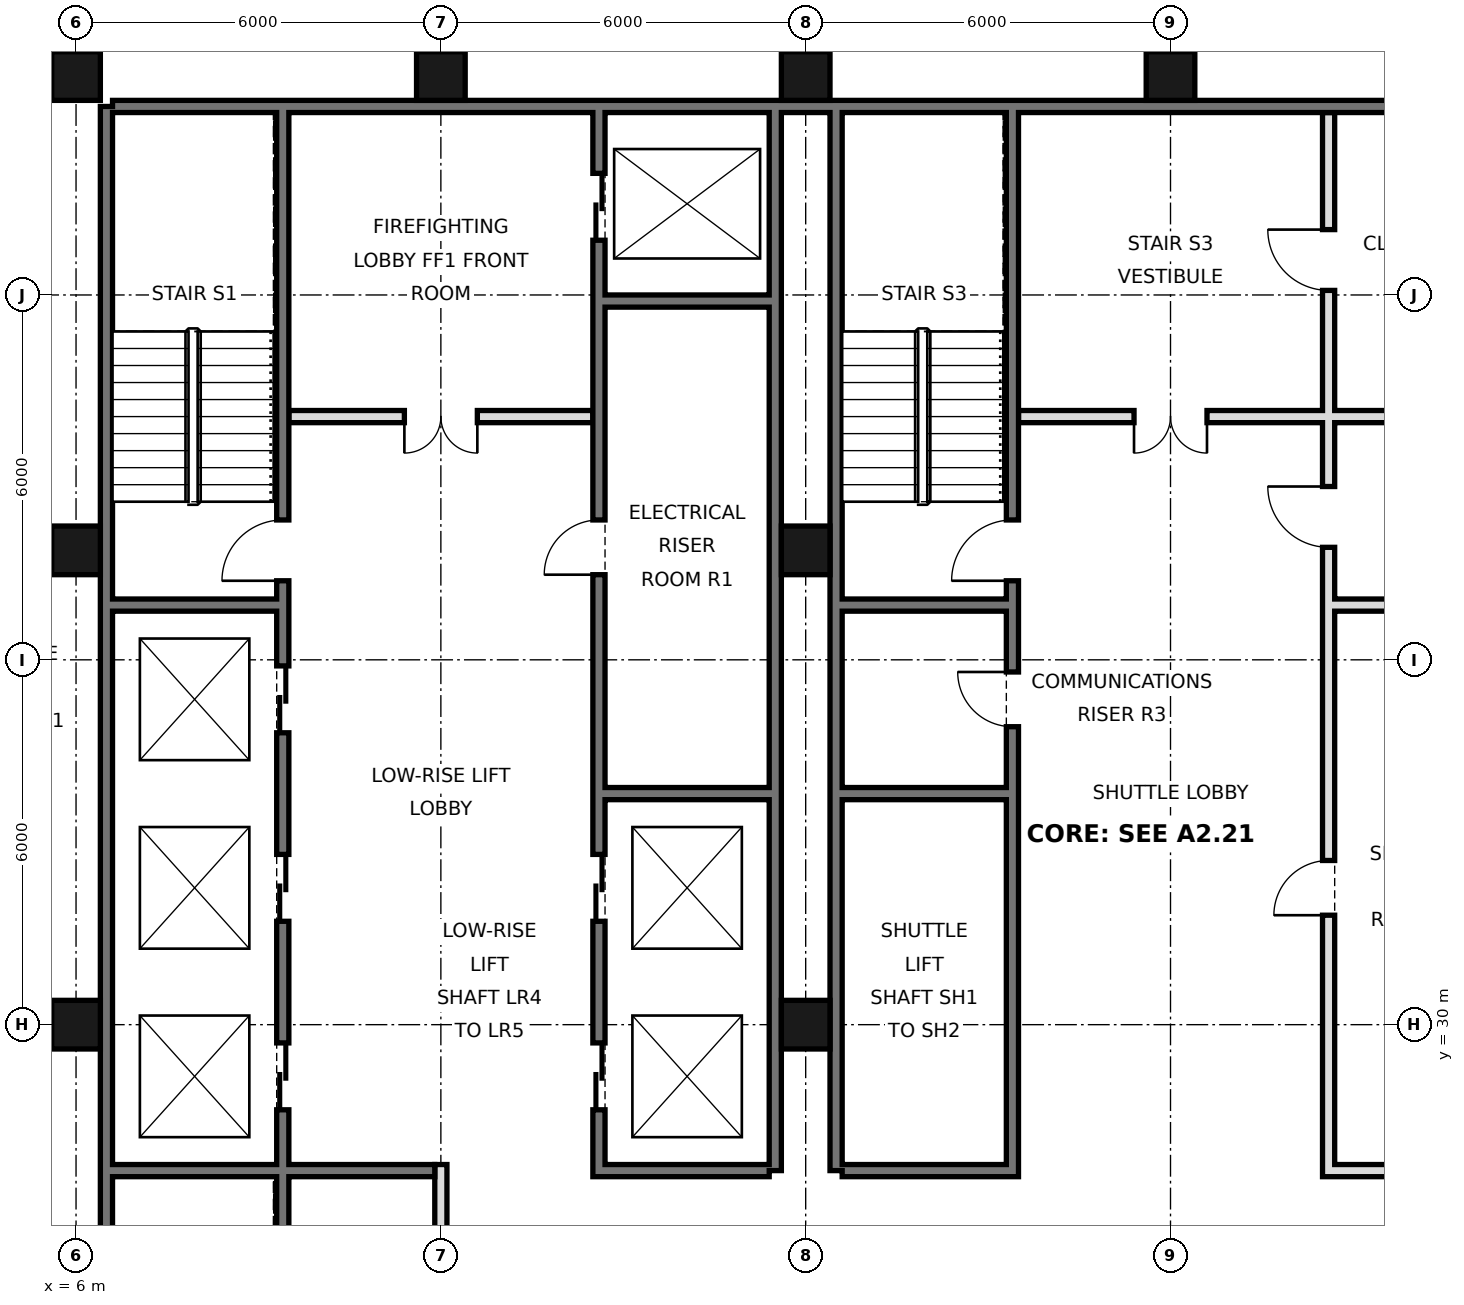
"""IFC4 building model, lengths in metres.
Left out: names, types, materials, properties, quantities, classifications, styles, units other than length and angle.
Written with IfcOpenShell. Run it as: python <this file> out.ifc"""

import sys

from ifc_helpers import new_model, si_unit, direction, frame, frame_2d, origin, origin_2d, place, context, subcontext, project, spatial, rectangle, hollow_rectangle, extrude, element, fill, save


model = new_model("IFC4")
c1 = context("Model", 3, precision=1e-05, world=origin(), true_north=direction((0.0, 1.0)))
c2 = subcontext(c1, "Body", "Model", "MODEL_VIEW")
j1 = project(units=[si_unit("LENGTHUNIT", "METRE"), si_unit("PLANEANGLEUNIT", "RADIAN")], contexts=[c1])
p1 = place(None, origin())
s1 = spatial("IfcSite", under=j1, at=p1, CompositionType="ELEMENT")
p2 = place(p1, origin())
s2 = spatial("IfcBuilding", under=s1, at=p2, CompositionType="ELEMENT")
p3 = place(p2, frame((0.0, 0.0, 82.2)))
s3 = spatial("IfcBuildingStorey", under=s2, at=p3, CompositionType="ELEMENT", Elevation=82.2)
for number, where, z_axis, x_axis in (
    (1, (6.0, 30.0, 0.0), (0.0, 0.0, 1.0), (1.0, 0.0, 0.0)),
    (2, (6.0, 37.8, 0.0), (0.0, 0.0, 1.0), (1.0, 0.0, 0.0)),
    (3, (6.0, 45.6, 0.0), (0.0, 0.0, 1.0), (1.0, 0.0, 0.0)),
    (4, (12.0, 45.6, 0.0), (0.0, 0.0, 1.0), (1.0, 0.0, 0.0)),
    (5, (18.0, 30.0, 0.0), (0.0, 0.0, 1.0), (1.0, 0.0, 0.0)),
    (6, (18.0, 37.8, 0.0), (0.0, 0.0, 1.0), (1.0, 0.0, 0.0)),
    (7, (18.0, 45.6, 0.0), (0.0, 0.0, 1.0), (1.0, 0.0, 0.0)),
    (8, (24.0, 45.6, 0.0), (0.0, 0.0, 1.0), (1.0, 0.0, 0.0)),
):
    element("IfcColumn", number, at=place(p3, frame(where, z_axis=z_axis, x_axis=x_axis)), inside=s3, PredefinedType="COLUMN", context=c2, shape_type="SweptSolid", body=[
        extrude(hollow_rectangle(XDim=0.8, YDim=0.8, WallThickness=0.06, at=origin_2d()), origin(), (0.0, 0.0, 1.0), 3.6),
    ])
p4 = place(p3, frame((6.5, 21.6, 0.0), z_axis=(0.0, 0.0, 1.0), x_axis=(0.0, 1.0, 0.0)))
e9 = element("IfcWall", 9, at=p4, inside=s3, PredefinedType="SOLIDWALL", context=c2, shape_type="SweptSolid", body=[
    extrude(rectangle(XDim=23.5, YDim=0.2, at=frame_2d((11.75, 0.0))), origin(), (0.0, 0.0, 1.0), 3.42),
])
p5 = place(p3, frame((6.6, 45.1, 0.0), z_axis=(0.0, 0.0, 1.0), x_axis=(1.0, 0.0, 0.0)))
e10 = element("IfcWall", 10, at=p5, inside=s3, PredefinedType="SOLIDWALL", context=c2, shape_type="SweptSolid", body=[
    extrude(rectangle(XDim=34.8, YDim=0.2, at=frame_2d((17.4, 0.0))), origin(), (0.0, 0.0, 1.0), 3.42),
])
for number, where, z_axis, x_axis in (
    (11, (17.5, 27.6, 0.0), (0.0, 0.0, 1.0), (0.0, 1.0, 0.0)),
    (12, (18.5, 27.6, 0.0), (0.0, 0.0, 1.0), (0.0, 1.0, 0.0)),
):
    element("IfcWall", number, at=place(p3, frame(where, z_axis=z_axis, x_axis=x_axis)), inside=s3, PredefinedType="SOLIDWALL", context=c2, shape_type="SweptSolid", body=[
        extrude(rectangle(XDim=17.5, YDim=0.2, at=frame_2d((8.75, 0.0))), origin(), (0.0, 0.0, 1.0), 3.42),
    ])
p6 = place(p3, frame((12.0, 21.6, 0.0), z_axis=(0.0, 0.0, 1.0), x_axis=(0.0, 1.0, 0.0)))
e13 = element("IfcWall", 13, at=p6, inside=s3, PredefinedType="PARTITIONING", context=c2, shape_type="SweptSolid", body=[
    extrude(rectangle(XDim=6.1, YDim=0.2, at=frame_2d((3.05, 0.0))), origin(), (0.0, 0.0, 1.0), 3.42),
])
p7 = place(p3, frame((14.6, 27.5, 0.0), z_axis=(0.0, 0.0, 1.0), x_axis=(0.0, 1.0, 0.0)))
e14 = element("IfcWall", 14, at=p7, inside=s3, PredefinedType="SOLIDWALL", context=c2, shape_type="SweptSolid", body=[
    extrude(rectangle(XDim=17.5, YDim=0.2, at=frame_2d((8.75, 0.0))), origin(), (0.0, 0.0, 1.0), 3.42),
])
p8 = place(p7, frame((1.1, 0.0, 0.0)))
e15 = element("IfcOpeningElement", 15, at=p8, cuts=e14, PredefinedType="OPENING", context=c2, shape_type="SweptSolid", body=[
    extrude(rectangle(XDim=1.1, YDim=2.1, at=frame_2d((0.55, 1.05))), frame((0.0, 0.11, 0.0), z_axis=(0.0, -1.0, 0.0), x_axis=(1.0, 0.0, 0.0)), (0.0, 0.0, 1.0), 0.22),
])
p9 = place(p7, frame((4.2, 0.0, 0.0)))
e16 = element("IfcOpeningElement", 16, at=p9, cuts=e14, PredefinedType="OPENING", context=c2, shape_type="SweptSolid", body=[
    extrude(rectangle(XDim=1.1, YDim=2.1, at=frame_2d((0.55, 1.05))), frame((0.0, 0.11, 0.0), z_axis=(0.0, -1.0, 0.0), x_axis=(1.0, 0.0, 0.0)), (0.0, 0.0, 1.0), 0.22),
])
p10 = place(p7, frame((15.4, 0.0, 0.0)))
e17 = element("IfcOpeningElement", 17, at=p10, cuts=e14, PredefinedType="OPENING", context=c2, shape_type="SweptSolid", body=[
    extrude(rectangle(XDim=1.1, YDim=2.1, at=frame_2d((0.55, 1.05))), frame((0.0, 0.11, 0.0), z_axis=(0.0, -1.0, 0.0), x_axis=(1.0, 0.0, 0.0)), (0.0, 0.0, 1.0), 0.22),
])
p11 = place(p7, frame((9.9, 0.0, 0.0)))
e18 = element("IfcOpeningElement", 18, at=p11, cuts=e14, PredefinedType="OPENING", context=c2, shape_type="SweptSolid", body=[
    extrude(rectangle(XDim=0.9, YDim=2.1, at=frame_2d((0.45, 1.05))), frame((0.0, 0.11, 0.0), z_axis=(0.0, -1.0, 0.0), x_axis=(1.0, 0.0, 0.0)), (0.0, 0.0, 1.0), 0.22),
])
p12 = place(p3, frame((21.4, 27.5, 0.0), z_axis=(0.0, 0.0, 1.0), x_axis=(0.0, 1.0, 0.0)))
e19 = element("IfcWall", 19, at=p12, inside=s3, PredefinedType="SOLIDWALL", context=c2, shape_type="SweptSolid", body=[
    extrude(rectangle(XDim=17.5, YDim=0.2, at=frame_2d((8.75, 0.0))), origin(), (0.0, 0.0, 1.0), 3.42),
])
p13 = place(p12, frame((9.8, 0.0, 0.0)))
e20 = element("IfcOpeningElement", 20, at=p13, cuts=e19, PredefinedType="OPENING", context=c2, shape_type="SweptSolid", body=[
    extrude(rectangle(XDim=1.0, YDim=2.1, at=frame_2d((0.5, 1.05))), frame((0.0, 0.11, 0.0), z_axis=(0.0, -1.0, 0.0), x_axis=(1.0, 0.0, 0.0)), (0.0, 0.0, 1.0), 0.22),
])
p14 = place(p12, frame((7.4, 0.0, 0.0)))
e21 = element("IfcOpeningElement", 21, at=p14, cuts=e19, PredefinedType="OPENING", context=c2, shape_type="SweptSolid", body=[
    extrude(rectangle(XDim=0.9, YDim=2.1, at=frame_2d((0.45, 1.05))), frame((0.0, 0.11, 0.0), z_axis=(0.0, -1.0, 0.0), x_axis=(1.0, 0.0, 0.0)), (0.0, 0.0, 1.0), 0.22),
])
p15 = place(p3, frame((26.6, 27.5, 0.0), z_axis=(0.0, 0.0, 1.0), x_axis=(0.0, 1.0, 0.0)))
e22 = element("IfcWall", 22, at=p15, inside=s3, PredefinedType="SOLIDWALL", context=c2, shape_type="SweptSolid", body=[
    extrude(rectangle(XDim=17.5, YDim=0.2, at=frame_2d((8.75, 0.0))), origin(), (0.0, 0.0, 1.0), 3.42),
])
p16 = place(p15, frame((4.3, 0.0, 0.0)))
e23 = element("IfcOpeningElement", 23, at=p16, cuts=e22, PredefinedType="OPENING", context=c2, shape_type="SweptSolid", body=[
    extrude(rectangle(XDim=0.9, YDim=2.1, at=frame_2d((0.45, 1.05))), frame((0.0, 0.11, 0.0), z_axis=(0.0, -1.0, 0.0), x_axis=(1.0, 0.0, 0.0)), (0.0, 0.0, 1.0), 0.22),
])
p17 = place(p15, frame((10.35, 0.0, 0.0)))
e24 = element("IfcOpeningElement", 24, at=p17, cuts=e22, PredefinedType="OPENING", context=c2, shape_type="SweptSolid", body=[
    extrude(rectangle(XDim=1.0, YDim=2.1, at=frame_2d((0.5, 1.05))), frame((0.0, 0.11, 0.0), z_axis=(0.0, -1.0, 0.0), x_axis=(1.0, 0.0, 0.0)), (0.0, 0.0, 1.0), 0.22),
])
p18 = place(p15, frame((14.575, 0.0, 0.0)))
e25 = element("IfcOpeningElement", 25, at=p18, cuts=e22, PredefinedType="OPENING", context=c2, shape_type="SweptSolid", body=[
    extrude(rectangle(XDim=1.0, YDim=2.1, at=frame_2d((0.5, 1.05))), frame((0.0, 0.11, 0.0), z_axis=(0.0, -1.0, 0.0), x_axis=(1.0, 0.0, 0.0)), (0.0, 0.0, 1.0), 0.22),
])
p19 = place(p3, frame((9.4, 21.6, 0.0), z_axis=(0.0, 0.0, 1.0), x_axis=(0.0, 1.0, 0.0)))
e26 = element("IfcWall", 26, at=p19, inside=s3, PredefinedType="SOLIDWALL", context=c2, shape_type="SweptSolid", body=[
    extrude(rectangle(XDim=23.4, YDim=0.2, at=frame_2d((11.7, 0.0))), origin(), (0.0, 0.0, 1.0), 3.42),
])
p20 = place(p19, frame((7.0, 0.0, 0.0)))
e27 = element("IfcOpeningElement", 27, at=p20, cuts=e26, PredefinedType="OPENING", context=c2, shape_type="SweptSolid", body=[
    extrude(rectangle(XDim=1.1, YDim=2.1, at=frame_2d((0.55, 1.05))), frame((0.0, 0.11, 0.0), z_axis=(0.0, -1.0, 0.0), x_axis=(1.0, 0.0, 0.0)), (0.0, 0.0, 1.0), 0.22),
])
p21 = place(p19, frame((10.1, 0.0, 0.0)))
e28 = element("IfcOpeningElement", 28, at=p21, cuts=e26, PredefinedType="OPENING", context=c2, shape_type="SweptSolid", body=[
    extrude(rectangle(XDim=1.1, YDim=2.1, at=frame_2d((0.55, 1.05))), frame((0.0, 0.11, 0.0), z_axis=(0.0, -1.0, 0.0), x_axis=(1.0, 0.0, 0.0)), (0.0, 0.0, 1.0), 0.22),
])
p22 = place(p19, frame((13.2, 0.0, 0.0)))
e29 = element("IfcOpeningElement", 29, at=p22, cuts=e26, PredefinedType="OPENING", context=c2, shape_type="SweptSolid", body=[
    extrude(rectangle(XDim=1.1, YDim=2.1, at=frame_2d((0.55, 1.05))), frame((0.0, 0.11, 0.0), z_axis=(0.0, -1.0, 0.0), x_axis=(1.0, 0.0, 0.0)), (0.0, 0.0, 1.0), 0.22),
])
p23 = place(p19, frame((15.7, 0.0, 0.0)))
e30 = element("IfcOpeningElement", 30, at=p23, cuts=e26, PredefinedType="OPENING", context=c2, shape_type="SweptSolid", body=[
    extrude(rectangle(XDim=1.0, YDim=2.1, at=frame_2d((0.5, 1.05))), frame((0.0, 0.11, 0.0), z_axis=(0.0, -1.0, 0.0), x_axis=(1.0, 0.0, 0.0)), (0.0, 0.0, 1.0), 0.22),
])
p24 = place(p19, frame((0.175, 0.0, 0.0)))
e31 = element("IfcOpeningElement", 31, at=p24, cuts=e26, PredefinedType="OPENING", context=c2, shape_type="SweptSolid", body=[
    extrude(rectangle(XDim=0.9, YDim=2.1, at=frame_2d((0.45, 1.05))), frame((0.0, 0.11, 0.0), z_axis=(0.0, -1.0, 0.0), x_axis=(1.0, 0.0, 0.0)), (0.0, 0.0, 1.0), 0.22),
])
for number, where, z_axis, x_axis in (
    (32, (14.7, 27.6, 0.0), (0.0, 0.0, 1.0), (1.0, 0.0, 0.0)),
    (33, (18.6, 27.6, 0.0), (0.0, 0.0, 1.0), (1.0, 0.0, 0.0)),
    (34, (26.7, 27.6, 0.0), (0.0, 0.0, 1.0), (1.0, 0.0, 0.0)),
):
    element("IfcWall", number, at=place(p3, frame(where, z_axis=z_axis, x_axis=x_axis)), inside=s3, PredefinedType="SOLIDWALL", context=c2, shape_type="SweptSolid", body=[
        extrude(rectangle(XDim=2.7, YDim=0.2, at=frame_2d((1.35, 0.0))), origin(), (0.0, 0.0, 1.0), 3.42),
    ])
p25 = place(p3, frame((6.6, 27.6, 0.0), z_axis=(0.0, 0.0, 1.0), x_axis=(1.0, 0.0, 0.0)))
e35 = element("IfcWall", 35, at=p25, inside=s3, PredefinedType="SOLIDWALL", context=c2, shape_type="SweptSolid", body=[
    extrude(rectangle(XDim=5.3, YDim=0.2, at=frame_2d((2.65, 0.0))), origin(), (0.0, 0.0, 1.0), 3.42),
])
for number, where, z_axis, x_axis in (
    (36, (14.7, 33.8, 0.0), (0.0, 0.0, 1.0), (1.0, 0.0, 0.0)),
    (37, (18.6, 33.8, 0.0), (0.0, 0.0, 1.0), (1.0, 0.0, 0.0)),
    (38, (18.6, 36.9, 0.0), (0.0, 0.0, 1.0), (1.0, 0.0, 0.0)),
    (39, (26.7, 36.9, 0.0), (0.0, 0.0, 1.0), (1.0, 0.0, 0.0)),
    (40, (6.6, 36.9, 0.0), (0.0, 0.0, 1.0), (1.0, 0.0, 0.0)),
):
    element("IfcWall", number, at=place(p3, frame(where, z_axis=z_axis, x_axis=x_axis)), inside=s3, PredefinedType="SOLIDWALL", context=c2, shape_type="SweptSolid", body=[
        extrude(rectangle(XDim=2.7, YDim=0.2, at=frame_2d((1.35, 0.0))), origin(), (0.0, 0.0, 1.0), 3.42),
    ])
p26 = place(p3, frame((21.5, 40.0, 0.0), z_axis=(0.0, 0.0, 1.0), x_axis=(1.0, 0.0, 0.0)))
e41 = element("IfcWall", 41, at=p26, inside=s3, PredefinedType="PARTITIONING", context=c2, shape_type="SweptSolid", body=[
    extrude(rectangle(XDim=7.9, YDim=0.2, at=frame_2d((3.95, 0.0))), origin(), (0.0, 0.0, 1.0), 3.42),
])
p27 = place(p26, frame((1.9, 0.0, 0.0)))
e42 = element("IfcOpeningElement", 42, at=p27, cuts=e41, PredefinedType="OPENING", context=c2, shape_type="SweptSolid", body=[
    extrude(rectangle(XDim=1.2, YDim=2.1, at=frame_2d((0.6, 1.05))), frame((0.0, 0.11, 0.0), z_axis=(0.0, -1.0, 0.0), x_axis=(1.0, 0.0, 0.0)), (0.0, 0.0, 1.0), 0.22),
])
p28 = place(p3, frame((9.5, 40.0, 0.0), z_axis=(0.0, 0.0, 1.0), x_axis=(1.0, 0.0, 0.0)))
e43 = element("IfcWall", 43, at=p28, inside=s3, PredefinedType="PARTITIONING", context=c2, shape_type="SweptSolid", body=[
    extrude(rectangle(XDim=5.0, YDim=0.2, at=frame_2d((2.5, 0.0))), origin(), (0.0, 0.0, 1.0), 3.42),
])
p29 = place(p28, frame((1.9, 0.0, 0.0)))
e44 = element("IfcOpeningElement", 44, at=p29, cuts=e43, PredefinedType="OPENING", context=c2, shape_type="SweptSolid", body=[
    extrude(rectangle(XDim=1.2, YDim=2.1, at=frame_2d((0.6, 1.05))), frame((0.0, 0.11, 0.0), z_axis=(0.0, -1.0, 0.0), x_axis=(1.0, 0.0, 0.0)), (0.0, 0.0, 1.0), 0.22),
])
p30 = place(p3, frame((14.7, 41.9, 0.0), z_axis=(0.0, 0.0, 1.0), x_axis=(1.0, 0.0, 0.0)))
e45 = element("IfcWall", 45, at=p30, inside=s3, PredefinedType="SOLIDWALL", context=c2, shape_type="SweptSolid", body=[
    extrude(rectangle(XDim=2.7, YDim=0.2, at=frame_2d((1.35, 0.0))), origin(), (0.0, 0.0, 1.0), 3.42),
])
p31 = place(p29, frame((1.2, 0.0, 0.0), z_axis=(0.0, 0.0, 1.0), x_axis=(-1.0, 0.0, 0.0)))
e46 = element("IfcDoor", 46, at=p31, inside=s3, OperationType="DOUBLE_DOOR_SINGLE_SWING", PredefinedType="DOOR", context=c2, shape_type="SweptSolid", body=[
    extrude(rectangle(XDim=1.2, YDim=2.1, at=frame_2d((0.6, 1.05))), frame((0.0, 0.025, 0.0), z_axis=(0.0, -1.0, 0.0), x_axis=(1.0, 0.0, 0.0)), (0.0, 0.0, 1.0), 0.05),
])
fill(e44, e46)
p32 = place(p27, frame((1.2, 0.0, 0.0), z_axis=(0.0, 0.0, 1.0), x_axis=(-1.0, 0.0, 0.0)))
e47 = element("IfcDoor", 47, at=p32, inside=s3, OperationType="DOUBLE_DOOR_SINGLE_SWING", PredefinedType="DOOR", context=c2, shape_type="SweptSolid", body=[
    extrude(rectangle(XDim=1.2, YDim=2.1, at=frame_2d((0.6, 1.05))), frame((0.0, 0.025, 0.0), z_axis=(0.0, -1.0, 0.0), x_axis=(1.0, 0.0, 0.0)), (0.0, 0.0, 1.0), 0.05),
])
fill(e42, e47)
p33 = place(p8, origin())
e48 = element("IfcDoor", 48, at=p33, inside=s3, OperationType="DOUBLE_DOOR_SLIDING", PredefinedType="DOOR", context=c2, shape_type="SweptSolid", body=[
    extrude(rectangle(XDim=1.1, YDim=2.1, at=frame_2d((0.55, 1.05))), frame((0.0, 0.025, 0.0), z_axis=(0.0, -1.0, 0.0), x_axis=(1.0, 0.0, 0.0)), (0.0, 0.0, 1.0), 0.05),
])
fill(e15, e48)
p34 = place(p9, origin())
e49 = element("IfcDoor", 49, at=p34, inside=s3, OperationType="DOUBLE_DOOR_SLIDING", PredefinedType="DOOR", context=c2, shape_type="SweptSolid", body=[
    extrude(rectangle(XDim=1.1, YDim=2.1, at=frame_2d((0.55, 1.05))), frame((0.0, 0.025, 0.0), z_axis=(0.0, -1.0, 0.0), x_axis=(1.0, 0.0, 0.0)), (0.0, 0.0, 1.0), 0.05),
])
fill(e16, e49)
p35 = place(p10, origin())
e50 = element("IfcDoor", 50, at=p35, inside=s3, OperationType="DOUBLE_DOOR_SLIDING", PredefinedType="DOOR", context=c2, shape_type="SweptSolid", body=[
    extrude(rectangle(XDim=1.1, YDim=2.1, at=frame_2d((0.55, 1.05))), frame((0.0, 0.025, 0.0), z_axis=(0.0, -1.0, 0.0), x_axis=(1.0, 0.0, 0.0)), (0.0, 0.0, 1.0), 0.05),
])
fill(e17, e50)
p36 = place(p20, origin())
e51 = element("IfcDoor", 51, at=p36, inside=s3, OperationType="DOUBLE_DOOR_SLIDING", PredefinedType="DOOR", context=c2, shape_type="SweptSolid", body=[
    extrude(rectangle(XDim=1.1, YDim=2.1, at=frame_2d((0.55, 1.05))), frame((0.0, 0.025, 0.0), z_axis=(0.0, -1.0, 0.0), x_axis=(1.0, 0.0, 0.0)), (0.0, 0.0, 1.0), 0.05),
])
fill(e27, e51)
p37 = place(p21, origin())
e52 = element("IfcDoor", 52, at=p37, inside=s3, OperationType="DOUBLE_DOOR_SLIDING", PredefinedType="DOOR", context=c2, shape_type="SweptSolid", body=[
    extrude(rectangle(XDim=1.1, YDim=2.1, at=frame_2d((0.55, 1.05))), frame((0.0, 0.025, 0.0), z_axis=(0.0, -1.0, 0.0), x_axis=(1.0, 0.0, 0.0)), (0.0, 0.0, 1.0), 0.05),
])
fill(e28, e52)
p38 = place(p22, origin())
e53 = element("IfcDoor", 53, at=p38, inside=s3, OperationType="DOUBLE_DOOR_SLIDING", PredefinedType="DOOR", context=c2, shape_type="SweptSolid", body=[
    extrude(rectangle(XDim=1.1, YDim=2.1, at=frame_2d((0.55, 1.05))), frame((0.0, 0.025, 0.0), z_axis=(0.0, -1.0, 0.0), x_axis=(1.0, 0.0, 0.0)), (0.0, 0.0, 1.0), 0.05),
])
fill(e29, e53)
p39 = place(p23, origin())
e54 = element("IfcDoor", 54, at=p39, inside=s3, OperationType="SINGLE_SWING_LEFT", PredefinedType="DOOR", context=c2, shape_type="SweptSolid", body=[
    extrude(rectangle(XDim=1.0, YDim=2.1, at=frame_2d((0.5, 1.05))), frame((0.0, 0.025, 0.0), z_axis=(0.0, -1.0, 0.0), x_axis=(1.0, 0.0, 0.0)), (0.0, 0.0, 1.0), 0.05),
])
fill(e30, e54)
p40 = place(p13, origin())
e55 = element("IfcDoor", 55, at=p40, inside=s3, OperationType="SINGLE_SWING_LEFT", PredefinedType="DOOR", context=c2, shape_type="SweptSolid", body=[
    extrude(rectangle(XDim=1.0, YDim=2.1, at=frame_2d((0.5, 1.05))), frame((0.0, 0.025, 0.0), z_axis=(0.0, -1.0, 0.0), x_axis=(1.0, 0.0, 0.0)), (0.0, 0.0, 1.0), 0.05),
])
fill(e20, e55)
p41 = place(p11, origin())
e56 = element("IfcDoor", 56, at=p41, inside=s3, OperationType="SINGLE_SWING_LEFT", PredefinedType="DOOR", context=c2, shape_type="SweptSolid", body=[
    extrude(rectangle(XDim=0.9, YDim=2.1, at=frame_2d((0.45, 1.05))), frame((0.0, 0.025, 0.0), z_axis=(0.0, -1.0, 0.0), x_axis=(1.0, 0.0, 0.0)), (0.0, 0.0, 1.0), 0.05),
])
fill(e18, e56)
p42 = place(p14, frame((0.9, 0.0, 0.0), z_axis=(0.0, 0.0, 1.0), x_axis=(-1.0, 0.0, 0.0)))
e57 = element("IfcDoor", 57, at=p42, inside=s3, OperationType="SINGLE_SWING_LEFT", PredefinedType="DOOR", context=c2, shape_type="SweptSolid", body=[
    extrude(rectangle(XDim=0.9, YDim=2.1, at=frame_2d((0.45, 1.05))), frame((0.0, 0.025, 0.0), z_axis=(0.0, -1.0, 0.0), x_axis=(1.0, 0.0, 0.0)), (0.0, 0.0, 1.0), 0.05),
])
fill(e21, e57)
p43 = place(p16, origin())
e58 = element("IfcDoor", 58, at=p43, inside=s3, OperationType="SINGLE_SWING_LEFT", PredefinedType="DOOR", context=c2, shape_type="SweptSolid", body=[
    extrude(rectangle(XDim=0.9, YDim=2.1, at=frame_2d((0.45, 1.05))), frame((0.0, 0.025, 0.0), z_axis=(0.0, -1.0, 0.0), x_axis=(1.0, 0.0, 0.0)), (0.0, 0.0, 1.0), 0.05),
])
fill(e23, e58)
p44 = place(p17, frame((1.0, 0.0, 0.0), z_axis=(0.0, 0.0, 1.0), x_axis=(-1.0, 0.0, 0.0)))
e59 = element("IfcDoor", 59, at=p44, inside=s3, OperationType="SINGLE_SWING_LEFT", PredefinedType="DOOR", context=c2, shape_type="SweptSolid", body=[
    extrude(rectangle(XDim=1.0, YDim=2.1, at=frame_2d((0.5, 1.05))), frame((0.0, 0.025, 0.0), z_axis=(0.0, -1.0, 0.0), x_axis=(1.0, 0.0, 0.0)), (0.0, 0.0, 1.0), 0.05),
])
fill(e24, e59)
p45 = place(p18, frame((1.0, 0.0, 0.0), z_axis=(0.0, 0.0, 1.0), x_axis=(-1.0, 0.0, 0.0)))
e60 = element("IfcDoor", 60, at=p45, inside=s3, OperationType="SINGLE_SWING_LEFT", PredefinedType="DOOR", context=c2, shape_type="SweptSolid", body=[
    extrude(rectangle(XDim=1.0, YDim=2.1, at=frame_2d((0.5, 1.05))), frame((0.0, 0.025, 0.0), z_axis=(0.0, -1.0, 0.0), x_axis=(1.0, 0.0, 0.0)), (0.0, 0.0, 1.0), 0.05),
])
fill(e25, e60)
save(model, sys.argv[1])
